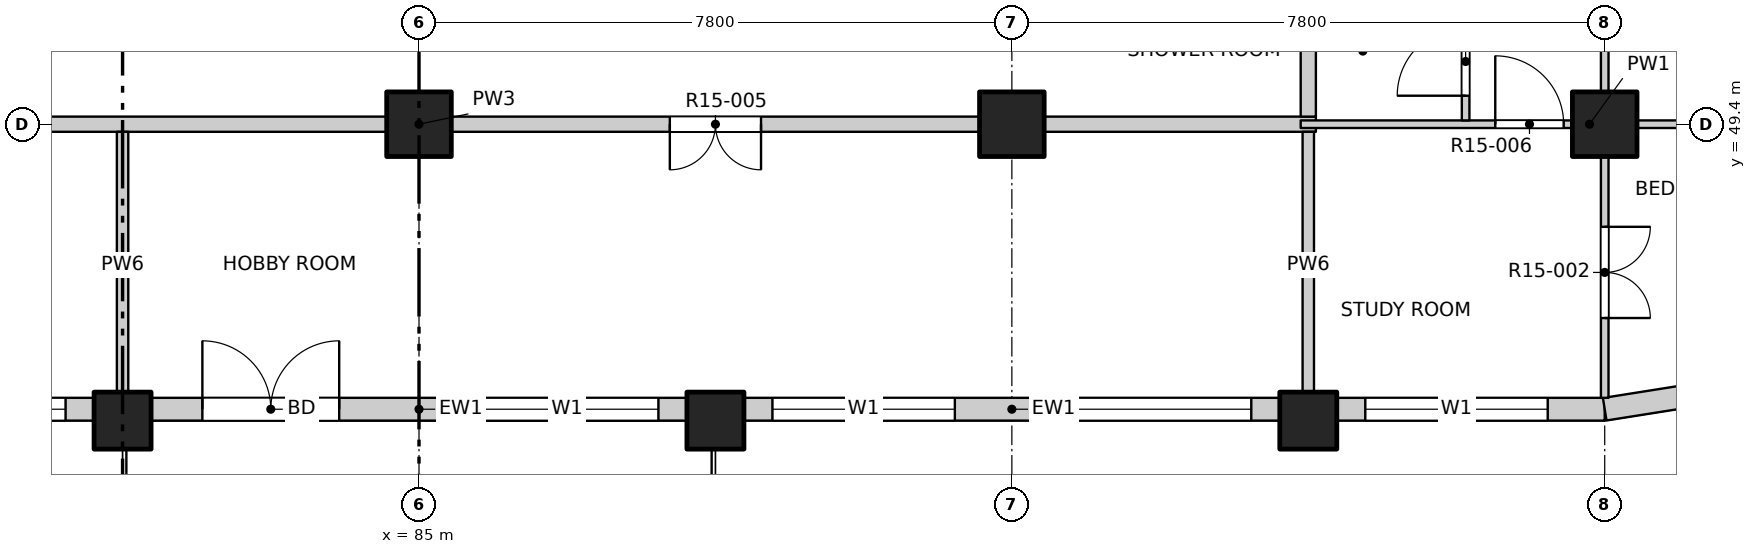
"""IFC4 building model, lengths in metres.
Left out: names, types, materials, properties, quantities, classifications, styles, units other than length and angle.
Written with IfcOpenShell. Run it as: python <this file> out.ifc"""

import sys

from ifc_helpers import new_model, si_unit, direction, frame, frame_2d, origin, origin_2d, place, context, subcontext, project, spatial, rectangle, extrude, element, fill, save


model = new_model("IFC4")
c1 = context("Model", 3, precision=1e-05, world=origin(), true_north=direction((0.0, 1.0)))
c2 = subcontext(c1, "Body", "Model", "MODEL_VIEW")
j1 = project(units=[si_unit("LENGTHUNIT", "METRE"), si_unit("PLANEANGLEUNIT", "RADIAN")], contexts=[c1])
p1 = place(None, origin())
s1 = spatial("IfcSite", under=j1, at=p1, CompositionType="ELEMENT")
p2 = place(p1, origin())
s2 = spatial("IfcBuilding", under=s1, at=p2, CompositionType="ELEMENT")
p3 = place(p2, frame((0.0, 0.0, 158.8)))
s3 = spatial("IfcBuildingStorey", under=s2, at=p3, CompositionType="ELEMENT", Elevation=158.8)
for number, where, z_axis, x_axis in (
    (1, (81.1, 45.5, -0.25), (0.0, 0.0, 1.0), (1.0, 0.0, 0.0)),
    (2, (88.9, 45.5, -0.25), (0.0, 0.0, 1.0), (1.0, 0.0, 0.0)),
    (3, (96.7, 45.5, -0.25), (0.0, 0.0, 1.0), (1.0, 0.0, 0.0)),
):
    element("IfcColumn", number, at=place(p3, frame(where, z_axis=z_axis, x_axis=x_axis)), inside=s3, PredefinedType="COLUMN", context=c2, shape_type="SweptSolid", body=[
        extrude(rectangle(XDim=0.75, YDim=0.75, at=origin_2d()), origin(), (0.0, 0.0, 1.0), 3.4),
    ])
for number, where, z_axis, x_axis in (
    (4, (85.0, 49.4, -0.25), (0.0, 0.0, 1.0), (1.0, 0.0, 0.0)),
    (5, (92.8, 49.4, -0.25), (0.0, 0.0, 1.0), (1.0, 0.0, 0.0)),
    (6, (100.6, 49.4, -0.25), (0.0, 0.0, 1.0), (1.0, 0.0, 0.0)),
):
    element("IfcColumn", number, at=place(p3, frame(where, z_axis=z_axis, x_axis=x_axis)), inside=s3, PredefinedType="COLUMN", context=c2, shape_type="SweptSolid", body=[
        extrude(rectangle(XDim=0.85, YDim=0.85, at=origin_2d()), origin(), (0.0, 0.0, 1.0), 3.4),
    ])
p4 = place(p3, frame((73.675, 45.65, 0.0), z_axis=(0.0, 0.0, 1.0), x_axis=(1.0, 0.0, 0.0)))
e7 = element("IfcWall", 7, at=p4, inside=s3, PredefinedType="SOLIDWALL", context=c2, shape_type="SweptSolid", body=[
    extrude(rectangle(XDim=7.05, YDim=0.3, at=frame_2d((3.525, 0.0))), origin(), (0.0, 0.0, 1.0), 2.7),
])
p5 = place(p4, frame((0.375, 0.0, 0.9)))
e8 = element("IfcOpeningElement", 8, at=p5, cuts=e7, PredefinedType="OPENING", context=c2, shape_type="SweptSolid", body=[
    extrude(rectangle(XDim=2.4, YDim=1.8, at=frame_2d((1.2, 0.9))), frame((0.0, 0.16, 0.0), z_axis=(0.0, -1.0, 0.0), x_axis=(1.0, 0.0, 0.0)), (0.0, 0.0, 1.0), 0.32),
])
p6 = place(p4, frame((4.275, 0.0, 0.9)))
e9 = element("IfcOpeningElement", 9, at=p6, cuts=e7, PredefinedType="OPENING", context=c2, shape_type="SweptSolid", body=[
    extrude(rectangle(XDim=2.4, YDim=1.8, at=frame_2d((1.2, 0.9))), frame((0.0, 0.16, 0.0), z_axis=(0.0, -1.0, 0.0), x_axis=(1.0, 0.0, 0.0)), (0.0, 0.0, 1.0), 0.32),
])
p7 = place(p3, frame((81.475, 45.65, 0.0), z_axis=(0.0, 0.0, 1.0), x_axis=(1.0, 0.0, 0.0)))
e10 = element("IfcWall", 10, at=p7, inside=s3, PredefinedType="SOLIDWALL", context=c2, shape_type="SweptSolid", body=[
    extrude(rectangle(XDim=7.05, YDim=0.3, at=frame_2d((3.525, 0.0))), origin(), (0.0, 0.0, 1.0), 2.7),
])
p8 = place(p7, frame((0.675, 0.0, 0.0)))
e11 = element("IfcOpeningElement", 11, at=p8, cuts=e10, PredefinedType="OPENING", context=c2, shape_type="SweptSolid", body=[
    extrude(rectangle(XDim=1.8, YDim=2.4, at=frame_2d((0.9, 1.2))), frame((0.0, 0.16, 0.0), z_axis=(0.0, -1.0, 0.0), x_axis=(1.0, 0.0, 0.0)), (0.0, 0.0, 1.0), 0.32),
])
p9 = place(p7, frame((4.275, 0.0, 0.9)))
e12 = element("IfcOpeningElement", 12, at=p9, cuts=e10, PredefinedType="OPENING", context=c2, shape_type="SweptSolid", body=[
    extrude(rectangle(XDim=2.4, YDim=1.8, at=frame_2d((1.2, 0.9))), frame((0.0, 0.16, 0.0), z_axis=(0.0, -1.0, 0.0), x_axis=(1.0, 0.0, 0.0)), (0.0, 0.0, 1.0), 0.32),
])
p10 = place(p3, frame((89.275, 45.65, 0.0), z_axis=(0.0, 0.0, 1.0), x_axis=(1.0, 0.0, 0.0)))
e13 = element("IfcWall", 13, at=p10, inside=s3, PredefinedType="SOLIDWALL", context=c2, shape_type="SweptSolid", body=[
    extrude(rectangle(XDim=7.05, YDim=0.3, at=frame_2d((3.525, 0.0))), origin(), (0.0, 0.0, 1.0), 2.7),
])
p11 = place(p10, frame((0.375, 0.0, 0.9)))
e14 = element("IfcOpeningElement", 14, at=p11, cuts=e13, PredefinedType="OPENING", context=c2, shape_type="SweptSolid", body=[
    extrude(rectangle(XDim=2.4, YDim=1.8, at=frame_2d((1.2, 0.9))), frame((0.0, 0.16, 0.0), z_axis=(0.0, -1.0, 0.0), x_axis=(1.0, 0.0, 0.0)), (0.0, 0.0, 1.0), 0.32),
])
p12 = place(p10, frame((4.275, 0.0, 0.9)))
e15 = element("IfcOpeningElement", 15, at=p12, cuts=e13, PredefinedType="OPENING", context=c2, shape_type="SweptSolid", body=[
    extrude(rectangle(XDim=2.4, YDim=1.8, at=frame_2d((1.2, 0.9))), frame((0.0, 0.16, 0.0), z_axis=(0.0, -1.0, 0.0), x_axis=(1.0, 0.0, 0.0)), (0.0, 0.0, 1.0), 0.32),
])
p13 = place(p3, frame((97.075, 45.65, 0.0), z_axis=(0.0, 0.0, 1.0), x_axis=(1.0, 0.0, 0.0)))
e16 = element("IfcWall", 16, at=p13, inside=s3, PredefinedType="SOLIDWALL", context=c2, shape_type="SweptSolid", body=[
    extrude(rectangle(XDim=3.525, YDim=0.3, at=frame_2d((1.763, 0.0))), origin(), (0.0, 0.0, 1.0), 2.7),
])
p14 = place(p13, frame((0.375, 0.0, 0.9)))
e17 = element("IfcOpeningElement", 17, at=p14, cuts=e16, PredefinedType="OPENING", context=c2, shape_type="SweptSolid", body=[
    extrude(rectangle(XDim=2.4, YDim=1.8, at=frame_2d((1.2, 0.9))), frame((0.0, 0.16, 0.0), z_axis=(0.0, -1.0, 0.0), x_axis=(1.0, 0.0, 0.0)), (0.0, 0.0, 1.0), 0.32),
])
p15 = place(p3, frame((100.6, 45.65, 0.0), z_axis=(0.0, 0.0, 1.0), x_axis=(0.987678452879, 0.156496880861, 0.0)))
e18 = element("IfcWall", 18, at=p15, inside=s3, PredefinedType="SOLIDWALL", context=c2, shape_type="SweptSolid", body=[
    extrude(rectangle(XDim=1.173, YDim=0.3, at=frame_2d((0.586, 0.0))), origin(), (0.0, 0.0, 1.0), 2.7),
])
p16 = place(p3, frame((73.2, 49.4, 0.0), z_axis=(0.0, 0.0, 1.0), x_axis=(1.0, 0.0, 0.0)))
e19 = element("IfcWall", 19, at=p16, inside=s3, PredefinedType="PARTITIONING", context=c2, shape_type="SweptSolid", body=[
    extrude(rectangle(XDim=23.6, YDim=0.2, at=frame_2d((11.8, 0.0))), origin(), (0.0, 0.0, 1.0), 3.15),
])
p17 = place(p16, frame((4.525, 0.0, 0.0)))
e20 = element("IfcOpeningElement", 20, at=p17, cuts=e19, PredefinedType="OPENING", context=c2, shape_type="SweptSolid", body=[
    extrude(rectangle(XDim=1.2, YDim=2.1, at=frame_2d((0.6, 1.05))), frame((0.0, 0.11, 0.0), z_axis=(0.0, -1.0, 0.0), x_axis=(1.0, 0.0, 0.0)), (0.0, 0.0, 1.0), 0.22),
])
p18 = place(p16, frame((15.1, 0.0, 0.0)))
e21 = element("IfcOpeningElement", 21, at=p18, cuts=e19, PredefinedType="OPENING", context=c2, shape_type="SweptSolid", body=[
    extrude(rectangle(XDim=1.2, YDim=2.1, at=frame_2d((0.6, 1.05))), frame((0.0, 0.11, 0.0), z_axis=(0.0, -1.0, 0.0), x_axis=(1.0, 0.0, 0.0)), (0.0, 0.0, 1.0), 0.22),
])
p19 = place(p3, frame((96.6, 49.4, 0.0), z_axis=(0.0, 0.0, 1.0), x_axis=(1.0, 0.0, 0.0)))
e22 = element("IfcWall", 22, at=p19, inside=s3, PredefinedType="PARTITIONING", context=c2, shape_type="SweptSolid", body=[
    extrude(rectangle(XDim=7.6, YDim=0.1, at=frame_2d((3.8, 0.0))), origin(), (0.0, 0.0, 1.0), 3.15),
])
p20 = place(p19, frame((2.56, 0.0, 0.0)))
e23 = element("IfcOpeningElement", 23, at=p20, cuts=e22, PredefinedType="OPENING", context=c2, shape_type="SweptSolid", body=[
    extrude(rectangle(XDim=0.9, YDim=2.1, at=frame_2d((0.45, 1.05))), frame((0.0, 0.06, 0.0), z_axis=(0.0, -1.0, 0.0), x_axis=(1.0, 0.0, 0.0)), (0.0, 0.0, 1.0), 0.12),
])
p21 = place(p3, frame((81.1, 45.8, 0.0), z_axis=(0.0, 0.0, 1.0), x_axis=(0.0, 1.0, 0.0)))
e24 = element("IfcWall", 24, at=p21, inside=s3, PredefinedType="PARTITIONING", context=c2, shape_type="SweptSolid", body=[
    extrude(rectangle(XDim=3.5, YDim=0.15, at=frame_2d((1.75, 0.0))), origin(), (0.0, 0.0, 1.0), 2.55),
])
p22 = place(p3, frame((96.7, 45.8, 0.0), z_axis=(0.0, 0.0, 1.0), x_axis=(0.0, 1.0, 0.0)))
e25 = element("IfcWall", 25, at=p22, inside=s3, PredefinedType="PARTITIONING", context=c2, shape_type="SweptSolid", body=[
    extrude(rectangle(XDim=3.5, YDim=0.15, at=frame_2d((1.75, 0.0))), origin(), (0.0, 0.0, 1.0), 3.15),
])
p23 = place(p3, frame((96.7, 49.5, 0.0), z_axis=(0.0, 0.0, 1.0), x_axis=(0.0, 1.0, 0.0)))
e26 = element("IfcWall", 26, at=p23, inside=s3, PredefinedType="PARTITIONING", context=c2, shape_type="SweptSolid", body=[
    extrude(rectangle(XDim=34.7, YDim=0.2, at=frame_2d((17.35, 0.0))), origin(), (0.0, 0.0, 1.0), 3.15),
])
p24 = place(p23, frame((3.875, 0.0, 0.0)))
e27 = element("IfcOpeningElement", 27, at=p24, cuts=e26, PredefinedType="OPENING", context=c2, shape_type="SweptSolid", body=[
    extrude(rectangle(XDim=1.0, YDim=2.1, at=frame_2d((0.5, 1.05))), frame((0.0, 0.11, 0.0), z_axis=(0.0, -1.0, 0.0), x_axis=(1.0, 0.0, 0.0)), (0.0, 0.0, 1.0), 0.22),
])
p25 = place(p23, frame((14.775, 0.0, 0.0)))
e28 = element("IfcOpeningElement", 28, at=p25, cuts=e26, PredefinedType="OPENING", context=c2, shape_type="SweptSolid", body=[
    extrude(rectangle(XDim=1.0, YDim=2.1, at=frame_2d((0.5, 1.05))), frame((0.0, 0.11, 0.0), z_axis=(0.0, -1.0, 0.0), x_axis=(1.0, 0.0, 0.0)), (0.0, 0.0, 1.0), 0.22),
])
p26 = place(p23, frame((29.175, 0.0, 0.0)))
e29 = element("IfcOpeningElement", 29, at=p26, cuts=e26, PredefinedType="OPENING", context=c2, shape_type="SweptSolid", body=[
    extrude(rectangle(XDim=1.0, YDim=2.1, at=frame_2d((0.5, 1.05))), frame((0.0, 0.11, 0.0), z_axis=(0.0, -1.0, 0.0), x_axis=(1.0, 0.0, 0.0)), (0.0, 0.0, 1.0), 0.22),
])
p27 = place(p3, frame((98.77, 49.45, 0.0), z_axis=(0.0, 0.0, 1.0), x_axis=(0.0, 1.0, 0.0)))
e30 = element("IfcWall", 30, at=p27, inside=s3, PredefinedType="PARTITIONING", context=c2, shape_type="SweptSolid", body=[
    extrude(rectangle(XDim=5.05, YDim=0.1, at=frame_2d((2.525, 0.0))), origin(), (0.0, 0.0, 1.0), 3.15),
])
p28 = place(p27, frame((0.325, 0.0, 0.0)))
e31 = element("IfcOpeningElement", 31, at=p28, cuts=e30, PredefinedType="OPENING", context=c2, shape_type="SweptSolid", body=[
    extrude(rectangle(XDim=0.9, YDim=2.1, at=frame_2d((0.45, 1.05))), frame((0.0, 0.06, 0.0), z_axis=(0.0, -1.0, 0.0), x_axis=(1.0, 0.0, 0.0)), (0.0, 0.0, 1.0), 0.12),
])
p29 = place(p27, frame((2.05, 0.0, 0.0)))
e32 = element("IfcOpeningElement", 32, at=p29, cuts=e30, PredefinedType="OPENING", context=c2, shape_type="SweptSolid", body=[
    extrude(rectangle(XDim=0.9, YDim=2.1, at=frame_2d((0.45, 1.05))), frame((0.0, 0.06, 0.0), z_axis=(0.0, -1.0, 0.0), x_axis=(1.0, 0.0, 0.0)), (0.0, 0.0, 1.0), 0.12),
])
p30 = place(p27, frame((3.85, 0.0, 0.0)))
e33 = element("IfcOpeningElement", 33, at=p30, cuts=e30, PredefinedType="OPENING", context=c2, shape_type="SweptSolid", body=[
    extrude(rectangle(XDim=0.8, YDim=2.1, at=frame_2d((0.4, 1.05))), frame((0.0, 0.06, 0.0), z_axis=(0.0, -1.0, 0.0), x_axis=(1.0, 0.0, 0.0)), (0.0, 0.0, 1.0), 0.12),
])
p31 = place(p3, frame((100.6, 45.8, 0.0), z_axis=(0.0, 0.0, 1.0), x_axis=(0.0, 1.0, 0.0)))
e34 = element("IfcWall", 34, at=p31, inside=s3, PredefinedType="PARTITIONING", context=c2, shape_type="SweptSolid", body=[
    extrude(rectangle(XDim=38.4, YDim=0.1, at=frame_2d((19.2, 0.0))), origin(), (0.0, 0.0, 1.0), 3.15),
])
p32 = place(p31, frame((1.05, 0.0, 0.0)))
e35 = element("IfcOpeningElement", 35, at=p32, cuts=e34, PredefinedType="OPENING", context=c2, shape_type="SweptSolid", body=[
    extrude(rectangle(XDim=1.2, YDim=2.1, at=frame_2d((0.6, 1.05))), frame((0.0, 0.06, 0.0), z_axis=(0.0, -1.0, 0.0), x_axis=(1.0, 0.0, 0.0)), (0.0, 0.0, 1.0), 0.12),
])
p33 = place(p31, frame((5.1, 0.0, 0.0)))
e36 = element("IfcOpeningElement", 36, at=p33, cuts=e34, PredefinedType="OPENING", context=c2, shape_type="SweptSolid", body=[
    extrude(rectangle(XDim=0.9, YDim=2.1, at=frame_2d((0.45, 1.05))), frame((0.0, 0.06, 0.0), z_axis=(0.0, -1.0, 0.0), x_axis=(1.0, 0.0, 0.0)), (0.0, 0.0, 1.0), 0.12),
])
p34 = place(p31, frame((9.0, 0.0, 0.0)))
e37 = element("IfcOpeningElement", 37, at=p34, cuts=e34, PredefinedType="OPENING", context=c2, shape_type="SweptSolid", body=[
    extrude(rectangle(XDim=0.9, YDim=2.1, at=frame_2d((0.45, 1.05))), frame((0.0, 0.06, 0.0), z_axis=(0.0, -1.0, 0.0), x_axis=(1.0, 0.0, 0.0)), (0.0, 0.0, 1.0), 0.12),
])
p35 = place(p31, frame((12.9, 0.0, 0.0)))
e38 = element("IfcOpeningElement", 38, at=p35, cuts=e34, PredefinedType="OPENING", context=c2, shape_type="SweptSolid", body=[
    extrude(rectangle(XDim=0.9, YDim=2.1, at=frame_2d((0.45, 1.05))), frame((0.0, 0.06, 0.0), z_axis=(0.0, -1.0, 0.0), x_axis=(1.0, 0.0, 0.0)), (0.0, 0.0, 1.0), 0.12),
])
p36 = place(p31, frame((19.725, 0.0, 0.0)))
e39 = element("IfcOpeningElement", 39, at=p36, cuts=e34, PredefinedType="OPENING", context=c2, shape_type="SweptSolid", body=[
    extrude(rectangle(XDim=1.2, YDim=2.1, at=frame_2d((0.6, 1.05))), frame((0.0, 0.06, 0.0), z_axis=(0.0, -1.0, 0.0), x_axis=(1.0, 0.0, 0.0)), (0.0, 0.0, 1.0), 0.12),
])
p37 = place(p31, frame((24.6, 0.0, 0.0)))
e40 = element("IfcOpeningElement", 40, at=p37, cuts=e34, PredefinedType="OPENING", context=c2, shape_type="SweptSolid", body=[
    extrude(rectangle(XDim=0.9, YDim=2.1, at=frame_2d((0.45, 1.05))), frame((0.0, 0.06, 0.0), z_axis=(0.0, -1.0, 0.0), x_axis=(1.0, 0.0, 0.0)), (0.0, 0.0, 1.0), 0.12),
])
p38 = place(p31, frame((30.3, 0.0, 0.0)))
e41 = element("IfcOpeningElement", 41, at=p38, cuts=e34, PredefinedType="OPENING", context=c2, shape_type="SweptSolid", body=[
    extrude(rectangle(XDim=1.2, YDim=2.1, at=frame_2d((0.6, 1.05))), frame((0.0, 0.06, 0.0), z_axis=(0.0, -1.0, 0.0), x_axis=(1.0, 0.0, 0.0)), (0.0, 0.0, 1.0), 0.12),
])
p39 = place(p31, frame((36.15, 0.0, 0.0)))
e42 = element("IfcOpeningElement", 42, at=p39, cuts=e34, PredefinedType="OPENING", context=c2, shape_type="SweptSolid", body=[
    extrude(rectangle(XDim=1.2, YDim=2.1, at=frame_2d((0.6, 1.05))), frame((0.0, 0.06, 0.0), z_axis=(0.0, -1.0, 0.0), x_axis=(1.0, 0.0, 0.0)), (0.0, 0.0, 1.0), 0.12),
])
p40 = place(p6, origin())
e43 = element("IfcWindow", 43, at=p40, inside=s3, PartitioningType="DOUBLE_PANEL_VERTICAL", PredefinedType="WINDOW", context=c2, shape_type="SweptSolid", body=[
    extrude(rectangle(XDim=2.4, YDim=1.8, at=frame_2d((1.2, 0.9))), frame((0.0, 0.03, 0.0), z_axis=(0.0, -1.0, 0.0), x_axis=(1.0, 0.0, 0.0)), (0.0, 0.0, 1.0), 0.06),
])
fill(e9, e43)
p41 = place(p8, origin())
e44 = element("IfcDoor", 44, at=p41, inside=s3, OperationType="DOUBLE_DOOR_SINGLE_SWING", PredefinedType="DOOR", context=c2, shape_type="SweptSolid", body=[
    extrude(rectangle(XDim=1.8, YDim=2.4, at=frame_2d((0.9, 1.2))), frame((0.0, 0.025, 0.0), z_axis=(0.0, -1.0, 0.0), x_axis=(1.0, 0.0, 0.0)), (0.0, 0.0, 1.0), 0.05),
])
fill(e11, e44)
p42 = place(p9, origin())
e45 = element("IfcWindow", 45, at=p42, inside=s3, PartitioningType="DOUBLE_PANEL_VERTICAL", PredefinedType="WINDOW", context=c2, shape_type="SweptSolid", body=[
    extrude(rectangle(XDim=2.4, YDim=1.8, at=frame_2d((1.2, 0.9))), frame((0.0, 0.03, 0.0), z_axis=(0.0, -1.0, 0.0), x_axis=(1.0, 0.0, 0.0)), (0.0, 0.0, 1.0), 0.06),
])
fill(e12, e45)
p43 = place(p11, origin())
e46 = element("IfcWindow", 46, at=p43, inside=s3, PartitioningType="DOUBLE_PANEL_VERTICAL", PredefinedType="WINDOW", context=c2, shape_type="SweptSolid", body=[
    extrude(rectangle(XDim=2.4, YDim=1.8, at=frame_2d((1.2, 0.9))), frame((0.0, 0.03, 0.0), z_axis=(0.0, -1.0, 0.0), x_axis=(1.0, 0.0, 0.0)), (0.0, 0.0, 1.0), 0.06),
])
fill(e14, e46)
p44 = place(p12, origin())
e47 = element("IfcWindow", 47, at=p44, inside=s3, PartitioningType="DOUBLE_PANEL_VERTICAL", PredefinedType="WINDOW", context=c2, shape_type="SweptSolid", body=[
    extrude(rectangle(XDim=2.4, YDim=1.8, at=frame_2d((1.2, 0.9))), frame((0.0, 0.03, 0.0), z_axis=(0.0, -1.0, 0.0), x_axis=(1.0, 0.0, 0.0)), (0.0, 0.0, 1.0), 0.06),
])
fill(e15, e47)
p45 = place(p14, origin())
e48 = element("IfcWindow", 48, at=p45, inside=s3, PartitioningType="DOUBLE_PANEL_VERTICAL", PredefinedType="WINDOW", context=c2, shape_type="SweptSolid", body=[
    extrude(rectangle(XDim=2.4, YDim=1.8, at=frame_2d((1.2, 0.9))), frame((0.0, 0.03, 0.0), z_axis=(0.0, -1.0, 0.0), x_axis=(1.0, 0.0, 0.0)), (0.0, 0.0, 1.0), 0.06),
])
fill(e17, e48)
p46 = place(p32, origin())
e49 = element("IfcDoor", 49, at=p46, inside=s3, OperationType="DOUBLE_DOOR_SINGLE_SWING", PredefinedType="DOOR", context=c2, shape_type="SweptSolid", body=[
    extrude(rectangle(XDim=1.2, YDim=2.1, at=frame_2d((0.6, 1.05))), frame((0.0, 0.025, 0.0), z_axis=(0.0, -1.0, 0.0), x_axis=(1.0, 0.0, 0.0)), (0.0, 0.0, 1.0), 0.05),
])
fill(e35, e49)
p47 = place(p18, origin())
e50 = element("IfcDoor", 50, at=p47, inside=s3, OperationType="DOUBLE_DOOR_SINGLE_SWING", PredefinedType="DOOR", context=c2, shape_type="SweptSolid", body=[
    extrude(rectangle(XDim=1.2, YDim=2.1, at=frame_2d((0.6, 1.05))), frame((0.0, 0.025, 0.0), z_axis=(0.0, -1.0, 0.0), x_axis=(1.0, 0.0, 0.0)), (0.0, 0.0, 1.0), 0.05),
])
fill(e21, e50)
p48 = place(p20, origin())
e51 = element("IfcDoor", 51, at=p48, inside=s3, OperationType="SINGLE_SWING_LEFT", PredefinedType="DOOR", context=c2, shape_type="SweptSolid", body=[
    extrude(rectangle(XDim=0.9, YDim=2.1, at=frame_2d((0.45, 1.05))), frame((0.0, 0.025, 0.0), z_axis=(0.0, -1.0, 0.0), x_axis=(1.0, 0.0, 0.0)), (0.0, 0.0, 1.0), 0.05),
])
fill(e23, e51)
p49 = place(p28, origin())
e52 = element("IfcDoor", 52, at=p49, inside=s3, OperationType="SINGLE_SWING_LEFT", PredefinedType="DOOR", context=c2, shape_type="SweptSolid", body=[
    extrude(rectangle(XDim=0.9, YDim=2.1, at=frame_2d((0.45, 1.05))), frame((0.0, 0.025, 0.0), z_axis=(0.0, -1.0, 0.0), x_axis=(1.0, 0.0, 0.0)), (0.0, 0.0, 1.0), 0.05),
])
fill(e31, e52)
save(model, sys.argv[1])
